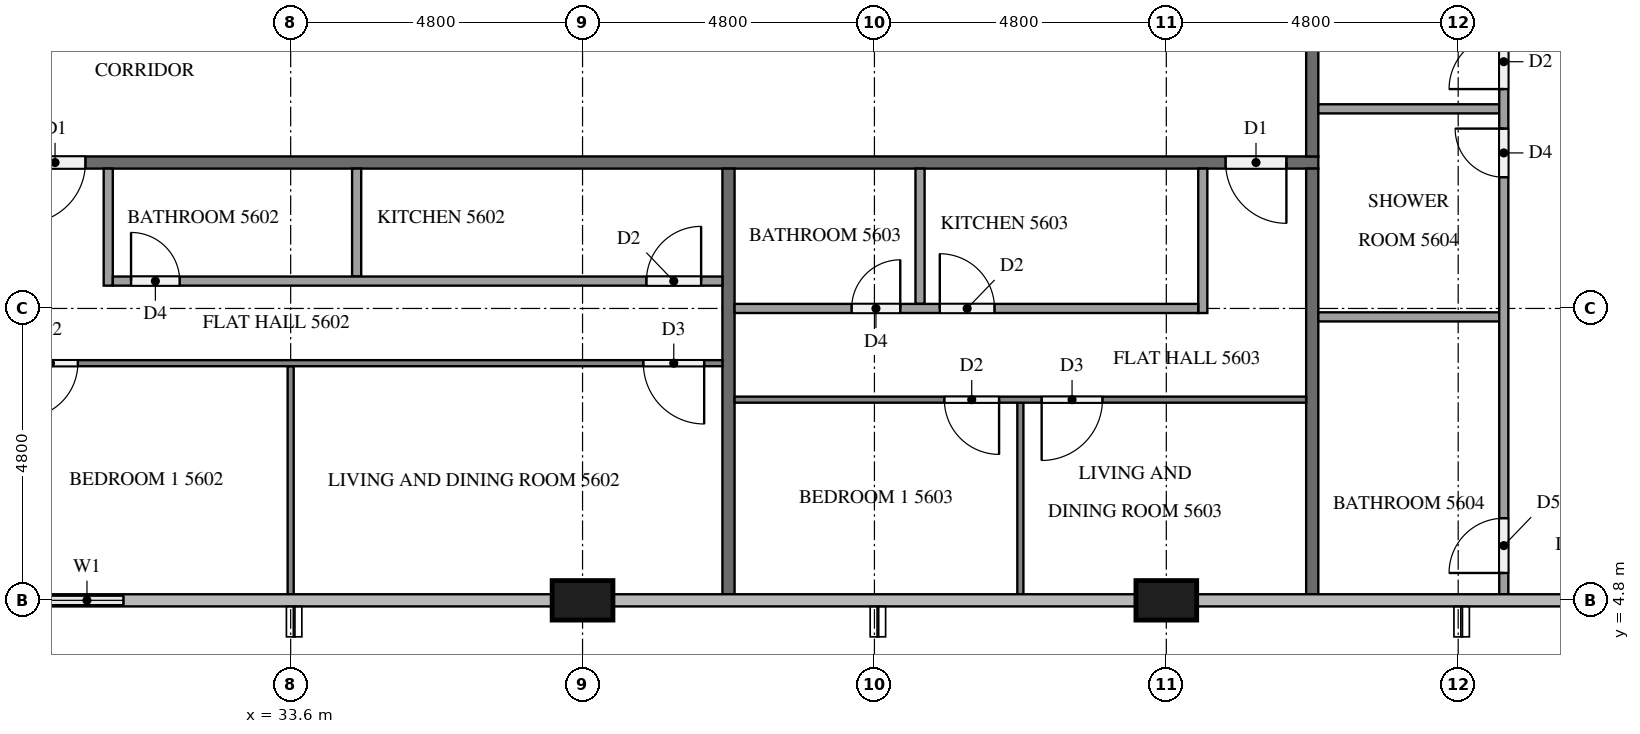
"""IFC4 building model, lengths in metres.
Left out: names, types, materials, properties, quantities, classifications, styles, units other than length and angle.
Written with IfcOpenShell. Run it as: python <this file> out.ifc"""

import sys

from ifc_helpers import new_model, si_unit, direction, frame, frame_2d, origin, origin_2d, place, context, subcontext, project, spatial, rectangle, extrude, element, fill, save


model = new_model("IFC4")
c1 = context("Model", 3, precision=1e-05, world=origin(), true_north=direction((0.0, 1.0)))
c2 = subcontext(c1, "Body", "Model", "MODEL_VIEW")
j1 = project(units=[si_unit("LENGTHUNIT", "METRE"), si_unit("PLANEANGLEUNIT", "RADIAN")], contexts=[c1])
p1 = place(None, origin())
s1 = spatial("IfcSite", under=j1, at=p1, CompositionType="ELEMENT")
p2 = place(p1, origin())
s2 = spatial("IfcBuilding", under=s1, at=p2, CompositionType="ELEMENT")
p3 = place(p2, frame((0.0, 0.0, 215.8)))
s3 = spatial("IfcBuildingStorey", under=s2, at=p3, CompositionType="ELEMENT", Elevation=215.8)
for number, where, z_axis, x_axis in (
    (1, (38.4, 4.8, 0.0), (0.0, 0.0, 1.0), (1.0, 0.0, 0.0)),
    (2, (48.0, 4.8, 0.0), (0.0, 0.0, 1.0), (1.0, 0.0, 0.0)),
):
    element("IfcColumn", number, at=place(p3, frame(where, z_axis=z_axis, x_axis=x_axis)), inside=s3, PredefinedType="COLUMN", context=c2, shape_type="SweptSolid", body=[
        extrude(rectangle(XDim=1.0, YDim=0.65, at=origin_2d()), origin(), (0.0, 0.0, 1.0), 3.2),
    ])
p4 = place(p3, frame((29.3, 4.8, 0.0), z_axis=(0.0, 0.0, 1.0), x_axis=(1.0, 0.0, 0.0)))
e3 = element("IfcWall", 3, at=p4, inside=s3, PredefinedType="SOLIDWALL", context=c2, shape_type="SweptSolid", body=[
    extrude(rectangle(XDim=1.9, YDim=0.15, at=frame_2d((0.95, 0.0))), origin(), (0.0, 0.0, 1.0), 3.2),
])
p5 = place(p4, frame((0.35, 0.0, 0.9)))
e4 = element("IfcOpeningElement", 4, at=p5, cuts=e3, PredefinedType="OPENING", context=c2, shape_type="SweptSolid", body=[
    extrude(rectangle(XDim=1.2, YDim=1.4, at=frame_2d((0.6, 0.7))), frame((0.0, 0.085, 0.0), z_axis=(0.0, -1.0, 0.0), x_axis=(1.0, 0.0, 0.0)), (0.0, 0.0, 1.0), 0.17),
])
p6 = place(p3, frame((50.5, 12.0, 0.0), z_axis=(0.0, 0.0, 1.0), x_axis=(-1.0, 0.0, 0.0)))
e5 = element("IfcWall", 5, at=p6, inside=s3, PredefinedType="PARTITIONING", context=c2, shape_type="SweptSolid", body=[
    extrude(rectangle(XDim=38.6, YDim=0.2, at=frame_2d((19.3, 0.0))), origin(), (0.0, 0.0, 1.0), 3.2),
])
p7 = place(p6, frame((37.075, 0.0, 0.0)))
e6 = element("IfcOpeningElement", 6, at=p7, cuts=e5, PredefinedType="OPENING", context=c2, shape_type="SweptSolid", body=[
    extrude(rectangle(XDim=1.0, YDim=2.1, at=frame_2d((0.5, 1.05))), frame((0.0, 0.11, 0.0), z_axis=(0.0, -1.0, 0.0), x_axis=(1.0, 0.0, 0.0)), (0.0, 0.0, 1.0), 0.22),
])
p8 = place(p6, frame((20.275, 0.0, 0.0)))
e7 = element("IfcOpeningElement", 7, at=p8, cuts=e5, PredefinedType="OPENING", context=c2, shape_type="SweptSolid", body=[
    extrude(rectangle(XDim=1.0, YDim=2.1, at=frame_2d((0.5, 1.05))), frame((0.0, 0.11, 0.0), z_axis=(0.0, -1.0, 0.0), x_axis=(1.0, 0.0, 0.0)), (0.0, 0.0, 1.0), 0.22),
])
p9 = place(p6, frame((0.525, 0.0, 0.0)))
e8 = element("IfcOpeningElement", 8, at=p9, cuts=e5, PredefinedType="OPENING", context=c2, shape_type="SweptSolid", body=[
    extrude(rectangle(XDim=1.0, YDim=2.1, at=frame_2d((0.5, 1.05))), frame((0.0, 0.11, 0.0), z_axis=(0.0, -1.0, 0.0), x_axis=(1.0, 0.0, 0.0)), (0.0, 0.0, 1.0), 0.22),
])
p10 = place(p3, frame((50.4, 40.7, 0.0), z_axis=(0.0, 0.0, 1.0), x_axis=(0.0, -1.0, 0.0)))
e9 = element("IfcWall", 9, at=p10, inside=s3, PredefinedType="PARTITIONING", context=c2, shape_type="SweptSolid", body=[
    extrude(rectangle(XDim=28.6, YDim=0.2, at=frame_2d((14.3, 0.0))), origin(), (0.0, 0.0, 1.0), 3.2),
])
p11 = place(p10, frame((19.525, 0.0, 0.0)))
e10 = element("IfcOpeningElement", 10, at=p11, cuts=e9, PredefinedType="OPENING", context=c2, shape_type="SweptSolid", body=[
    extrude(rectangle(XDim=1.0, YDim=2.1, at=frame_2d((0.5, 1.05))), frame((0.0, 0.11, 0.0), z_axis=(0.0, -1.0, 0.0), x_axis=(1.0, 0.0, 0.0)), (0.0, 0.0, 1.0), 0.22),
])
p12 = place(p10, frame((7.525, 0.0, 0.0)))
e11 = element("IfcOpeningElement", 11, at=p12, cuts=e9, PredefinedType="OPENING", context=c2, shape_type="SweptSolid", body=[
    extrude(rectangle(XDim=1.0, YDim=2.1, at=frame_2d((0.5, 1.05))), frame((0.0, 0.11, 0.0), z_axis=(0.0, -1.0, 0.0), x_axis=(1.0, 0.0, 0.0)), (0.0, 0.0, 1.0), 0.22),
])
p13 = place(p10, frame((0.325, 0.0, 0.0)))
e12 = element("IfcOpeningElement", 12, at=p13, cuts=e9, PredefinedType="OPENING", context=c2, shape_type="SweptSolid", body=[
    extrude(rectangle(XDim=1.0, YDim=2.1, at=frame_2d((0.5, 1.05))), frame((0.0, 0.11, 0.0), z_axis=(0.0, -1.0, 0.0), x_axis=(1.0, 0.0, 0.0)), (0.0, 0.0, 1.0), 0.22),
])
for number, where, z_axis, x_axis in (
    (13, (40.8, 11.9, 0.0), (0.0, 0.0, 1.0), (0.0, -1.0, 0.0)),
    (14, (50.4, 11.9, 0.0), (0.0, 0.0, 1.0), (0.0, -1.0, 0.0)),
):
    element("IfcWall", number, at=place(p3, frame(where, z_axis=z_axis, x_axis=x_axis)), inside=s3, PredefinedType="PARTITIONING", context=c2, shape_type="SweptSolid", body=[
        extrude(rectangle(XDim=7.0, YDim=0.2, at=frame_2d((3.5, 0.0))), origin(), (0.0, 0.0, 1.0), 3.2),
    ])
p14 = place(p3, frame((33.6, 8.65, 0.0), z_axis=(0.0, 0.0, 1.0), x_axis=(0.0, -1.0, 0.0)))
e15 = element("IfcWall", 15, at=p14, inside=s3, PredefinedType="PARTITIONING", context=c2, shape_type="SweptSolid", body=[
    extrude(rectangle(XDim=3.75, YDim=0.1, at=frame_2d((1.875, 0.0))), origin(), (0.0, 0.0, 1.0), 3.2),
])
p15 = place(p3, frame((40.7, 8.7, 0.0), z_axis=(0.0, 0.0, 1.0), x_axis=(-1.0, 0.0, 0.0)))
e16 = element("IfcWall", 16, at=p15, inside=s3, PredefinedType="PARTITIONING", context=c2, shape_type="SweptSolid", body=[
    extrude(rectangle(XDim=11.8, YDim=0.1, at=frame_2d((5.9, 0.0))), origin(), (0.0, 0.0, 1.0), 3.2),
])
p16 = place(p15, frame((10.6, 0.0, 0.0)))
e17 = element("IfcOpeningElement", 17, at=p16, cuts=e16, PredefinedType="OPENING", context=c2, shape_type="SweptSolid", body=[
    extrude(rectangle(XDim=0.9, YDim=2.1, at=frame_2d((0.45, 1.05))), frame((0.0, 0.06, 0.0), z_axis=(0.0, -1.0, 0.0), x_axis=(1.0, 0.0, 0.0)), (0.0, 0.0, 1.0), 0.12),
])
p17 = place(p15, frame((0.3, 0.0, 0.0)))
e18 = element("IfcOpeningElement", 18, at=p17, cuts=e16, PredefinedType="OPENING", context=c2, shape_type="SweptSolid", body=[
    extrude(rectangle(XDim=1.0, YDim=2.1, at=frame_2d((0.5, 1.05))), frame((0.0, 0.06, 0.0), z_axis=(0.0, -1.0, 0.0), x_axis=(1.0, 0.0, 0.0)), (0.0, 0.0, 1.0), 0.12),
])
p18 = place(p3, frame((34.685, 11.9, 0.0), z_axis=(0.0, 0.0, 1.0), x_axis=(0.0, -1.0, 0.0)))
e19 = element("IfcWall", 19, at=p18, inside=s3, PredefinedType="PARTITIONING", context=c2, shape_type="SweptSolid", body=[
    extrude(rectangle(XDim=1.775, YDim=0.15, at=frame_2d((0.887, 0.0))), origin(), (0.0, 0.0, 1.0), 3.2),
])
p19 = place(p3, frame((30.6, 11.9, 0.0), z_axis=(0.0, 0.0, 1.0), x_axis=(0.0, -1.0, 0.0)))
e20 = element("IfcWall", 20, at=p19, inside=s3, PredefinedType="PARTITIONING", context=c2, shape_type="SweptSolid", body=[
    extrude(rectangle(XDim=1.925, YDim=0.15, at=frame_2d((0.962, 0.0))), origin(), (0.0, 0.0, 1.0), 3.2),
])
p20 = place(p3, frame((30.675, 10.05, 0.0), z_axis=(0.0, 0.0, 1.0), x_axis=(1.0, 0.0, 0.0)))
e21 = element("IfcWall", 21, at=p20, inside=s3, PredefinedType="PARTITIONING", context=c2, shape_type="SweptSolid", body=[
    extrude(rectangle(XDim=10.025, YDim=0.15, at=frame_2d((5.012, 0.0))), origin(), (0.0, 0.0, 1.0), 3.2),
])
p21 = place(p20, frame((0.3, 0.0, 0.0)))
e22 = element("IfcOpeningElement", 22, at=p21, cuts=e21, PredefinedType="OPENING", context=c2, shape_type="SweptSolid", body=[
    extrude(rectangle(XDim=0.8, YDim=2.1, at=frame_2d((0.4, 1.05))), frame((0.0, 0.085, 0.0), z_axis=(0.0, -1.0, 0.0), x_axis=(1.0, 0.0, 0.0)), (0.0, 0.0, 1.0), 0.17),
])
p22 = place(p20, frame((8.775, 0.0, 0.0)))
e23 = element("IfcOpeningElement", 23, at=p22, cuts=e21, PredefinedType="OPENING", context=c2, shape_type="SweptSolid", body=[
    extrude(rectangle(XDim=0.9, YDim=2.1, at=frame_2d((0.45, 1.05))), frame((0.0, 0.085, 0.0), z_axis=(0.0, -1.0, 0.0), x_axis=(1.0, 0.0, 0.0)), (0.0, 0.0, 1.0), 0.17),
])
p23 = place(p3, frame((45.6, 8.05, 0.0), z_axis=(0.0, 0.0, 1.0), x_axis=(0.0, -1.0, 0.0)))
e24 = element("IfcWall", 24, at=p23, inside=s3, PredefinedType="PARTITIONING", context=c2, shape_type="SweptSolid", body=[
    extrude(rectangle(XDim=3.15, YDim=0.1, at=frame_2d((1.575, 0.0))), origin(), (0.0, 0.0, 1.0), 3.2),
])
p24 = place(p3, frame((50.3, 8.1, 0.0), z_axis=(0.0, 0.0, 1.0), x_axis=(-1.0, 0.0, 0.0)))
e25 = element("IfcWall", 25, at=p24, inside=s3, PredefinedType="PARTITIONING", context=c2, shape_type="SweptSolid", body=[
    extrude(rectangle(XDim=9.4, YDim=0.1, at=frame_2d((4.7, 0.0))), origin(), (0.0, 0.0, 1.0), 3.2),
])
p25 = place(p24, frame((3.35, 0.0, 0.0)))
e26 = element("IfcOpeningElement", 26, at=p25, cuts=e25, PredefinedType="OPENING", context=c2, shape_type="SweptSolid", body=[
    extrude(rectangle(XDim=1.0, YDim=2.1, at=frame_2d((0.5, 1.05))), frame((0.0, 0.06, 0.0), z_axis=(0.0, -1.0, 0.0), x_axis=(1.0, 0.0, 0.0)), (0.0, 0.0, 1.0), 0.12),
])
p26 = place(p24, frame((5.05, 0.0, 0.0)))
e27 = element("IfcOpeningElement", 27, at=p26, cuts=e25, PredefinedType="OPENING", context=c2, shape_type="SweptSolid", body=[
    extrude(rectangle(XDim=0.9, YDim=2.1, at=frame_2d((0.45, 1.05))), frame((0.0, 0.06, 0.0), z_axis=(0.0, -1.0, 0.0), x_axis=(1.0, 0.0, 0.0)), (0.0, 0.0, 1.0), 0.12),
])
p27 = place(p3, frame((43.95, 11.9, 0.0), z_axis=(0.0, 0.0, 1.0), x_axis=(0.0, -1.0, 0.0)))
e28 = element("IfcWall", 28, at=p27, inside=s3, PredefinedType="PARTITIONING", context=c2, shape_type="SweptSolid", body=[
    extrude(rectangle(XDim=2.225, YDim=0.15, at=frame_2d((1.112, 0.0))), origin(), (0.0, 0.0, 1.0), 3.2),
])
p28 = place(p3, frame((48.6, 11.9, 0.0), z_axis=(0.0, 0.0, 1.0), x_axis=(0.0, -1.0, 0.0)))
e29 = element("IfcWall", 29, at=p28, inside=s3, PredefinedType="PARTITIONING", context=c2, shape_type="SweptSolid", body=[
    extrude(rectangle(XDim=2.375, YDim=0.15, at=frame_2d((1.188, 0.0))), origin(), (0.0, 0.0, 1.0), 3.2),
])
p29 = place(p3, frame((40.9, 9.6, 0.0), z_axis=(0.0, 0.0, 1.0), x_axis=(1.0, 0.0, 0.0)))
e30 = element("IfcWall", 30, at=p29, inside=s3, PredefinedType="PARTITIONING", context=c2, shape_type="SweptSolid", body=[
    extrude(rectangle(XDim=7.625, YDim=0.15, at=frame_2d((3.812, 0.0))), origin(), (0.0, 0.0, 1.0), 3.2),
])
p30 = place(p29, frame((3.375, 0.0, 0.0)))
e31 = element("IfcOpeningElement", 31, at=p30, cuts=e30, PredefinedType="OPENING", context=c2, shape_type="SweptSolid", body=[
    extrude(rectangle(XDim=0.9, YDim=2.1, at=frame_2d((0.45, 1.05))), frame((0.0, 0.085, 0.0), z_axis=(0.0, -1.0, 0.0), x_axis=(1.0, 0.0, 0.0)), (0.0, 0.0, 1.0), 0.17),
])
p31 = place(p29, frame((1.925, 0.0, 0.0)))
e32 = element("IfcOpeningElement", 32, at=p31, cuts=e30, PredefinedType="OPENING", context=c2, shape_type="SweptSolid", body=[
    extrude(rectangle(XDim=0.8, YDim=2.1, at=frame_2d((0.4, 1.05))), frame((0.0, 0.085, 0.0), z_axis=(0.0, -1.0, 0.0), x_axis=(1.0, 0.0, 0.0)), (0.0, 0.0, 1.0), 0.17),
])
for number, where, z_axis, x_axis in (
    (33, (50.5, 12.883, 0.0), (0.0, 0.0, 1.0), (1.0, 0.0, 0.0)),
    (34, (50.5, 9.461, 0.0), (0.0, 0.0, 1.0), (1.0, 0.0, 0.0)),
):
    element("IfcWall", number, at=place(p3, frame(where, z_axis=z_axis, x_axis=x_axis)), inside=s3, PredefinedType="PARTITIONING", context=c2, shape_type="SweptSolid", body=[
        extrude(rectangle(XDim=2.975, YDim=0.15, at=frame_2d((1.488, 0.0))), origin(), (0.0, 0.0, 1.0), 3.2),
    ])
p32 = place(p3, frame((53.55, 4.9, 0.0), z_axis=(0.0, 0.0, 1.0), x_axis=(0.0, 1.0, 0.0)))
e35 = element("IfcWall", 35, at=p32, inside=s3, PredefinedType="PARTITIONING", context=c2, shape_type="SweptSolid", body=[
    extrude(rectangle(XDim=14.825, YDim=0.15, at=frame_2d((7.413, 0.0))), origin(), (0.0, 0.0, 1.0), 3.2),
])
p33 = place(p32, frame((8.308, 0.0, 0.0)))
e36 = element("IfcOpeningElement", 36, at=p33, cuts=e35, PredefinedType="OPENING", context=c2, shape_type="SweptSolid", body=[
    extrude(rectangle(XDim=0.9, YDim=2.1, at=frame_2d((0.45, 1.05))), frame((0.0, 0.085, 0.0), z_axis=(0.0, -1.0, 0.0), x_axis=(1.0, 0.0, 0.0)), (0.0, 0.0, 1.0), 0.17),
])
p34 = place(p32, frame((6.858, 0.0, 0.0)))
e37 = element("IfcOpeningElement", 37, at=p34, cuts=e35, PredefinedType="OPENING", context=c2, shape_type="SweptSolid", body=[
    extrude(rectangle(XDim=0.8, YDim=2.1, at=frame_2d((0.4, 1.05))), frame((0.0, 0.085, 0.0), z_axis=(0.0, -1.0, 0.0), x_axis=(1.0, 0.0, 0.0)), (0.0, 0.0, 1.0), 0.17),
])
p35 = place(p32, frame((0.35, 0.0, 0.0)))
e38 = element("IfcOpeningElement", 38, at=p35, cuts=e35, PredefinedType="OPENING", context=c2, shape_type="SweptSolid", body=[
    extrude(rectangle(XDim=0.9, YDim=2.1, at=frame_2d((0.45, 1.05))), frame((0.0, 0.085, 0.0), z_axis=(0.0, -1.0, 0.0), x_axis=(1.0, 0.0, 0.0)), (0.0, 0.0, 1.0), 0.17),
])
p36 = place(p5, origin())
e39 = element("IfcWindow", 39, at=p36, inside=s3, PartitioningType="SINGLE_PANEL", PredefinedType="WINDOW", context=c2, shape_type="SweptSolid", body=[
    extrude(rectangle(XDim=1.2, YDim=1.4, at=frame_2d((0.6, 0.7))), frame((0.0, 0.03, 0.0), z_axis=(0.0, -1.0, 0.0), x_axis=(1.0, 0.0, 0.0)), (0.0, 0.0, 1.0), 0.06),
])
fill(e4, e39)
p37 = place(p8, origin())
e40 = element("IfcDoor", 40, at=p37, inside=s3, OperationType="SINGLE_SWING_RIGHT", PredefinedType="DOOR", context=c2, shape_type="SweptSolid", body=[
    extrude(rectangle(XDim=1.0, YDim=2.1, at=frame_2d((0.5, 1.05))), frame((0.0, 0.025, 0.0), z_axis=(0.0, -1.0, 0.0), x_axis=(1.0, 0.0, 0.0)), (0.0, 0.0, 1.0), 0.05),
])
fill(e7, e40)
p38 = place(p9, origin())
e41 = element("IfcDoor", 41, at=p38, inside=s3, OperationType="SINGLE_SWING_LEFT", PredefinedType="DOOR", context=c2, shape_type="SweptSolid", body=[
    extrude(rectangle(XDim=1.0, YDim=2.1, at=frame_2d((0.5, 1.05))), frame((0.0, 0.025, 0.0), z_axis=(0.0, -1.0, 0.0), x_axis=(1.0, 0.0, 0.0)), (0.0, 0.0, 1.0), 0.05),
])
fill(e8, e41)
p39 = place(p16, origin())
e42 = element("IfcDoor", 42, at=p39, inside=s3, OperationType="SINGLE_SWING_RIGHT", PredefinedType="DOOR", context=c2, shape_type="SweptSolid", body=[
    extrude(rectangle(XDim=0.9, YDim=2.1, at=frame_2d((0.45, 1.05))), frame((0.0, 0.025, 0.0), z_axis=(0.0, -1.0, 0.0), x_axis=(1.0, 0.0, 0.0)), (0.0, 0.0, 1.0), 0.05),
])
fill(e17, e42)
p40 = place(p17, origin())
e43 = element("IfcDoor", 43, at=p40, inside=s3, OperationType="SINGLE_SWING_LEFT", PredefinedType="DOOR", context=c2, shape_type="SweptSolid", body=[
    extrude(rectangle(XDim=1.0, YDim=2.1, at=frame_2d((0.5, 1.05))), frame((0.0, 0.025, 0.0), z_axis=(0.0, -1.0, 0.0), x_axis=(1.0, 0.0, 0.0)), (0.0, 0.0, 1.0), 0.05),
])
fill(e18, e43)
p41 = place(p21, origin())
e44 = element("IfcDoor", 44, at=p41, inside=s3, OperationType="SINGLE_SWING_LEFT", PredefinedType="DOOR", context=c2, shape_type="SweptSolid", body=[
    extrude(rectangle(XDim=0.8, YDim=2.1, at=frame_2d((0.4, 1.05))), frame((0.0, 0.025, 0.0), z_axis=(0.0, -1.0, 0.0), x_axis=(1.0, 0.0, 0.0)), (0.0, 0.0, 1.0), 0.05),
])
fill(e22, e44)
p42 = place(p22, origin())
e45 = element("IfcDoor", 45, at=p42, inside=s3, OperationType="SINGLE_SWING_RIGHT", PredefinedType="DOOR", context=c2, shape_type="SweptSolid", body=[
    extrude(rectangle(XDim=0.9, YDim=2.1, at=frame_2d((0.45, 1.05))), frame((0.0, 0.025, 0.0), z_axis=(0.0, -1.0, 0.0), x_axis=(1.0, 0.0, 0.0)), (0.0, 0.0, 1.0), 0.05),
])
fill(e23, e45)
p43 = place(p25, origin())
e46 = element("IfcDoor", 46, at=p43, inside=s3, OperationType="SINGLE_SWING_RIGHT", PredefinedType="DOOR", context=c2, shape_type="SweptSolid", body=[
    extrude(rectangle(XDim=1.0, YDim=2.1, at=frame_2d((0.5, 1.05))), frame((0.0, 0.025, 0.0), z_axis=(0.0, -1.0, 0.0), x_axis=(1.0, 0.0, 0.0)), (0.0, 0.0, 1.0), 0.05),
])
fill(e26, e46)
p44 = place(p26, origin())
e47 = element("IfcDoor", 47, at=p44, inside=s3, OperationType="SINGLE_SWING_LEFT", PredefinedType="DOOR", context=c2, shape_type="SweptSolid", body=[
    extrude(rectangle(XDim=0.9, YDim=2.1, at=frame_2d((0.45, 1.05))), frame((0.0, 0.025, 0.0), z_axis=(0.0, -1.0, 0.0), x_axis=(1.0, 0.0, 0.0)), (0.0, 0.0, 1.0), 0.05),
])
fill(e27, e47)
p45 = place(p30, origin())
e48 = element("IfcDoor", 48, at=p45, inside=s3, OperationType="SINGLE_SWING_LEFT", PredefinedType="DOOR", context=c2, shape_type="SweptSolid", body=[
    extrude(rectangle(XDim=0.9, YDim=2.1, at=frame_2d((0.45, 1.05))), frame((0.0, 0.025, 0.0), z_axis=(0.0, -1.0, 0.0), x_axis=(1.0, 0.0, 0.0)), (0.0, 0.0, 1.0), 0.05),
])
fill(e31, e48)
p46 = place(p31, origin())
e49 = element("IfcDoor", 49, at=p46, inside=s3, OperationType="SINGLE_SWING_RIGHT", PredefinedType="DOOR", context=c2, shape_type="SweptSolid", body=[
    extrude(rectangle(XDim=0.8, YDim=2.1, at=frame_2d((0.4, 1.05))), frame((0.0, 0.025, 0.0), z_axis=(0.0, -1.0, 0.0), x_axis=(1.0, 0.0, 0.0)), (0.0, 0.0, 1.0), 0.05),
])
fill(e32, e49)
p47 = place(p33, origin())
e50 = element("IfcDoor", 50, at=p47, inside=s3, OperationType="SINGLE_SWING_LEFT", PredefinedType="DOOR", context=c2, shape_type="SweptSolid", body=[
    extrude(rectangle(XDim=0.9, YDim=2.1, at=frame_2d((0.45, 1.05))), frame((0.0, 0.025, 0.0), z_axis=(0.0, -1.0, 0.0), x_axis=(1.0, 0.0, 0.0)), (0.0, 0.0, 1.0), 0.05),
])
fill(e36, e50)
p48 = place(p34, origin())
e51 = element("IfcDoor", 51, at=p48, inside=s3, OperationType="SINGLE_SWING_RIGHT", PredefinedType="DOOR", context=c2, shape_type="SweptSolid", body=[
    extrude(rectangle(XDim=0.8, YDim=2.1, at=frame_2d((0.4, 1.05))), frame((0.0, 0.025, 0.0), z_axis=(0.0, -1.0, 0.0), x_axis=(1.0, 0.0, 0.0)), (0.0, 0.0, 1.0), 0.05),
])
fill(e37, e51)
p49 = place(p35, origin())
e52 = element("IfcDoor", 52, at=p49, inside=s3, OperationType="SINGLE_SWING_LEFT", PredefinedType="DOOR", context=c2, shape_type="SweptSolid", body=[
    extrude(rectangle(XDim=0.9, YDim=2.1, at=frame_2d((0.45, 1.05))), frame((0.0, 0.025, 0.0), z_axis=(0.0, -1.0, 0.0), x_axis=(1.0, 0.0, 0.0)), (0.0, 0.0, 1.0), 0.05),
])
fill(e38, e52)
save(model, sys.argv[1])
